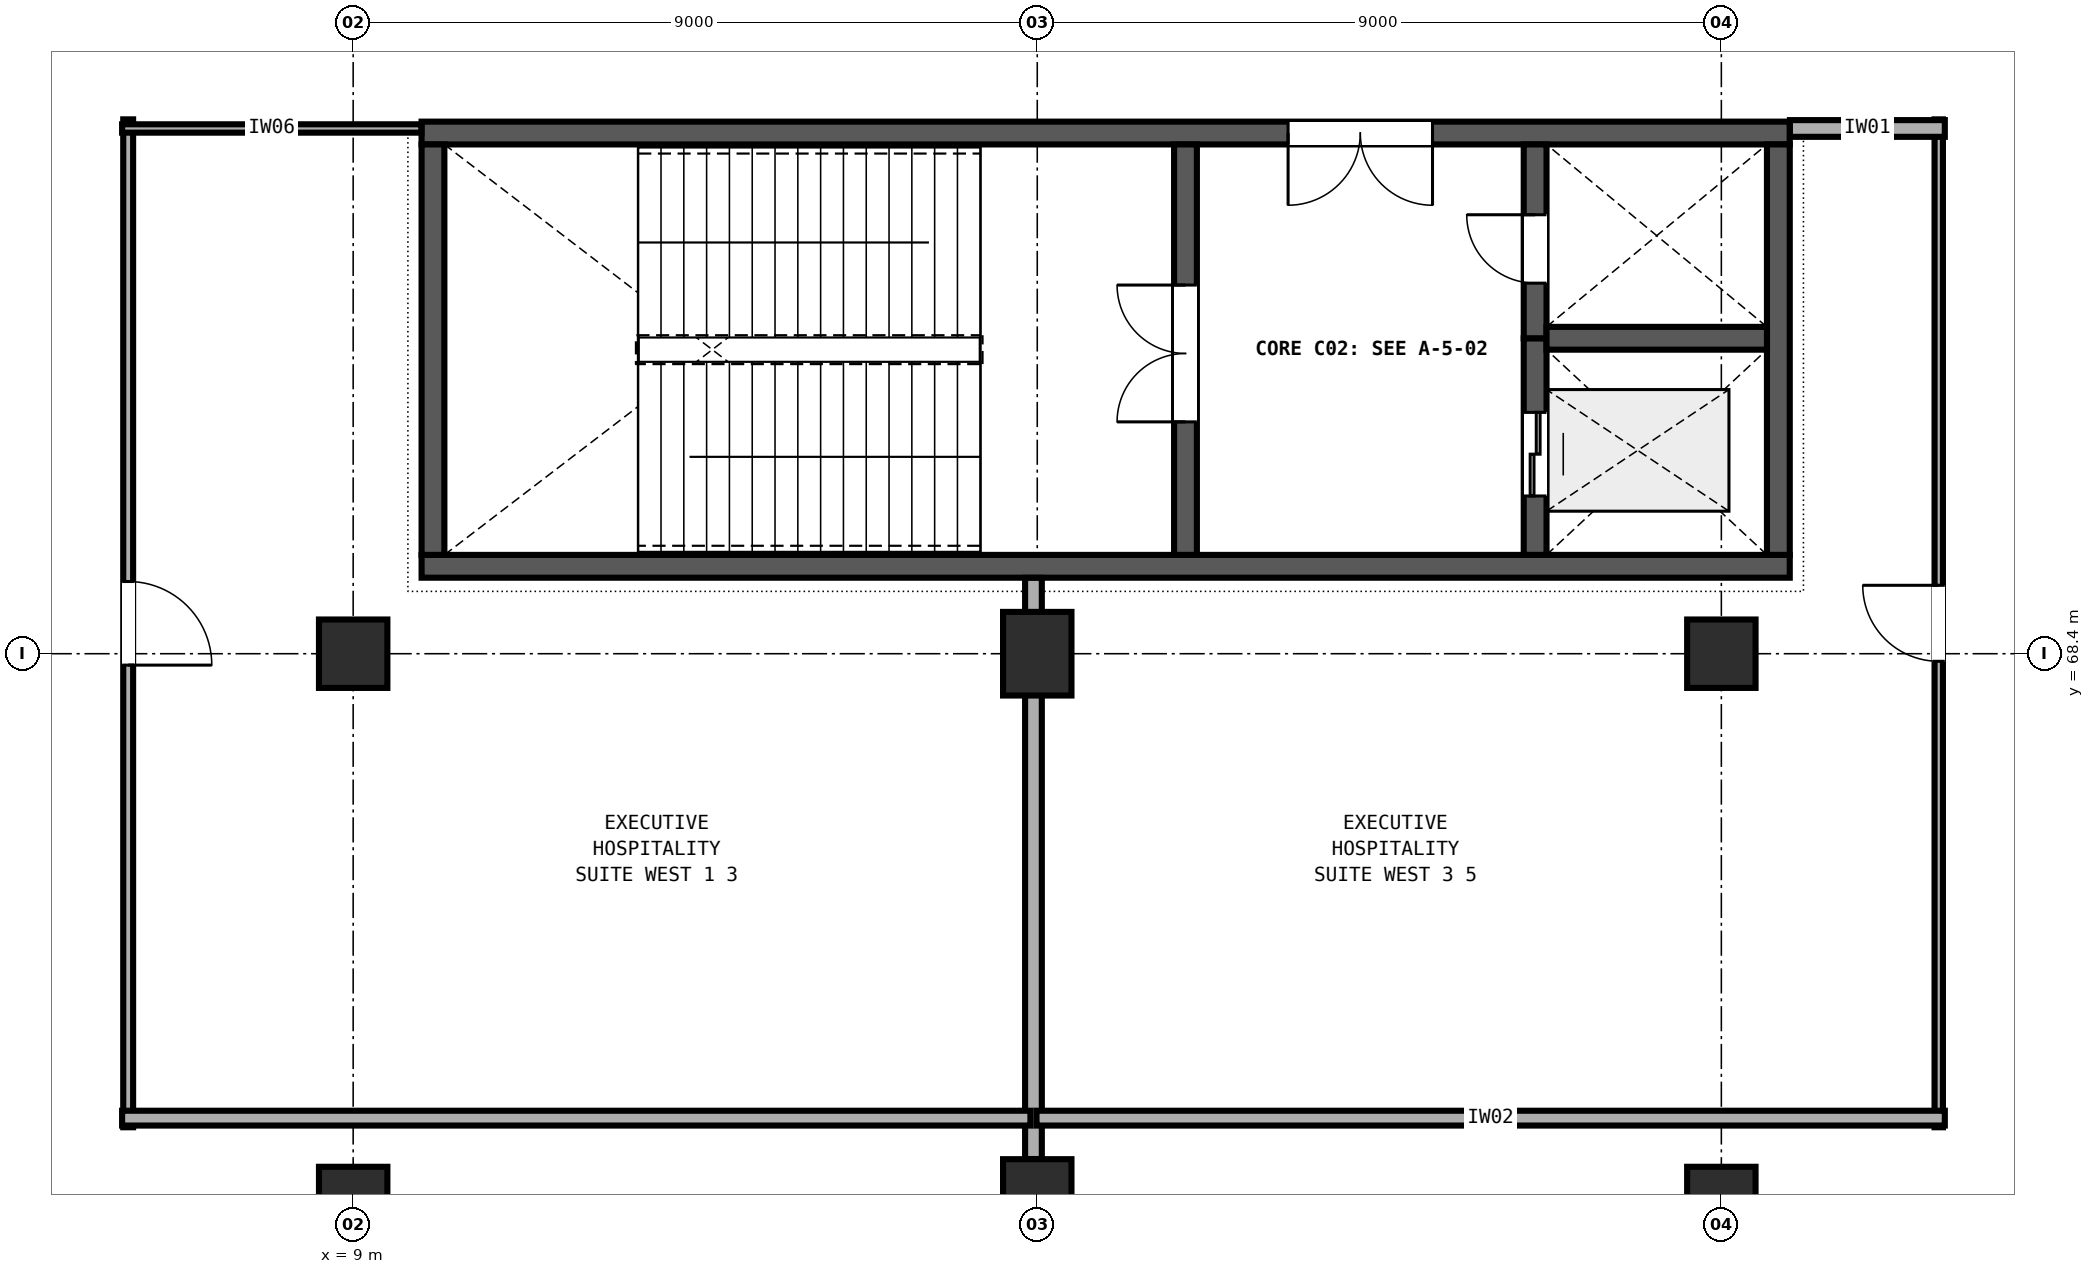
"""IFC4 building model, lengths in metres.
Left out: names, types, materials, properties, quantities, classifications, styles, units other than length and angle.
Written with IfcOpenShell. Run it as: python <this file> out.ifc"""

import sys

from ifc_helpers import new_model, si_unit, direction, frame, frame_2d, origin, origin_2d, place, context, subcontext, project, spatial, rectangle, extrude, element, fill, save


model = new_model("IFC4")
c1 = context("Model", 3, precision=1e-05, world=origin(), true_north=direction((0.0, 1.0)))
c2 = subcontext(c1, "Body", "Model", "MODEL_VIEW")
j1 = project(units=[si_unit("LENGTHUNIT", "METRE"), si_unit("PLANEANGLEUNIT", "RADIAN")], contexts=[c1])
p1 = place(None, origin())
s1 = spatial("IfcSite", under=j1, at=p1, CompositionType="ELEMENT")
p2 = place(p1, origin())
s2 = spatial("IfcBuilding", under=s1, at=p2, CompositionType="ELEMENT")
p3 = place(p2, frame((0.0, 0.0, 14.4)))
s3 = spatial("IfcBuildingStorey", under=s2, at=p3, CompositionType="ELEMENT", Elevation=14.4)
for number, where, z_axis, x_axis in (
    (1, (9.0, 61.2, 0.0), (0.0, 0.0, 1.0), (1.0, 0.0, 0.0)),
    (2, (9.0, 68.4, 0.0), (0.0, 0.0, 1.0), (1.0, 0.0, 0.0)),
):
    element("IfcColumn", number, at=place(p3, frame(where, z_axis=z_axis, x_axis=x_axis)), inside=s3, PredefinedType="COLUMN", context=c2, shape_type="SweptSolid", body=[
        extrude(rectangle(XDim=0.9, YDim=0.9, at=origin_2d()), origin(), (0.0, 0.0, 1.0), 4.8),
    ])
for number, where, z_axis, x_axis in (
    (3, (18.0, 61.2, 0.0), (0.0, 0.0, 1.0), (1.0, 0.0, 0.0)),
    (4, (18.0, 68.4, 0.0), (0.0, 0.0, 1.0), (1.0, 0.0, 0.0)),
):
    element("IfcColumn", number, at=place(p3, frame(where, z_axis=z_axis, x_axis=x_axis)), inside=s3, PredefinedType="COLUMN", context=c2, shape_type="SweptSolid", body=[
        extrude(rectangle(XDim=0.9, YDim=1.1, at=origin_2d()), origin(), (0.0, 0.0, 1.0), 4.8),
    ])
for number, where, z_axis, x_axis in (
    (5, (27.0, 61.2, 0.0), (0.0, 0.0, 1.0), (1.0, 0.0, 0.0)),
    (6, (27.0, 68.4, 0.0), (0.0, 0.0, 1.0), (1.0, 0.0, 0.0)),
):
    element("IfcColumn", number, at=place(p3, frame(where, z_axis=z_axis, x_axis=x_axis)), inside=s3, PredefinedType="COLUMN", context=c2, shape_type="SweptSolid", body=[
        extrude(rectangle(XDim=0.9, YDim=0.9, at=origin_2d()), origin(), (0.0, 0.0, 1.0), 4.8),
    ])
p4 = place(p3, frame((9.9, 69.55, 0.0), z_axis=(0.0, 0.0, 1.0), x_axis=(1.0, 0.0, 0.0)))
e7 = element("IfcWall", 7, at=p4, inside=s3, PredefinedType="SHEAR", context=c2, shape_type="SweptSolid", body=[
    extrude(rectangle(XDim=18.0, YDim=0.3, at=frame_2d((9.0, 0.0))), origin(), (0.0, 0.0, 1.0), 4.48),
])
p5 = place(p3, frame((27.9, 75.25, 0.0), z_axis=(0.0, 0.0, 1.0), x_axis=(-1.0, 0.0, 0.0)))
e8 = element("IfcWall", 8, at=p5, inside=s3, PredefinedType="SHEAR", context=c2, shape_type="SweptSolid", body=[
    extrude(rectangle(XDim=18.0, YDim=0.3, at=frame_2d((9.0, 0.0))), origin(), (0.0, 0.0, 1.0), 4.48),
])
p6 = place(p5, frame((4.7, 0.0, 0.0)))
e9 = element("IfcOpeningElement", 9, at=p6, cuts=e8, PredefinedType="OPENING", context=c2, shape_type="SweptSolid", body=[
    extrude(rectangle(XDim=1.9, YDim=2.25, at=frame_2d((0.95, 1.125))), frame((0.0, 0.16, 0.0), z_axis=(0.0, -1.0, 0.0), x_axis=(1.0, 0.0, 0.0)), (0.0, 0.0, 1.0), 0.32),
])
for number, where, z_axis, x_axis in (
    (10, (10.05, 75.1, 0.0), (0.0, 0.0, 1.0), (0.0, -1.0, 0.0)),
    (11, (27.75, 69.7, 0.0), (0.0, 0.0, 1.0), (0.0, 1.0, 0.0)),
):
    element("IfcWall", number, at=place(p3, frame(where, z_axis=z_axis, x_axis=x_axis)), inside=s3, PredefinedType="SHEAR", context=c2, shape_type="SweptSolid", body=[
        extrude(rectangle(XDim=5.4, YDim=0.3, at=frame_2d((2.7, 0.0))), origin(), (0.0, 0.0, 1.0), 4.48),
    ])
p7 = place(p3, frame((19.95, 69.7, 0.0), z_axis=(0.0, 0.0, 1.0), x_axis=(0.0, 1.0, 0.0)))
e12 = element("IfcWall", 12, at=p7, inside=s3, PredefinedType="SHEAR", context=c2, shape_type="SweptSolid", body=[
    extrude(rectangle(XDim=5.4, YDim=0.3, at=frame_2d((2.7, 0.0))), origin(), (0.0, 0.0, 1.0), 4.48),
])
p8 = place(p7, frame((1.75, 0.0, 0.0)))
e13 = element("IfcOpeningElement", 13, at=p8, cuts=e12, PredefinedType="OPENING", context=c2, shape_type="SweptSolid", body=[
    extrude(rectangle(XDim=1.8, YDim=2.25, at=frame_2d((0.9, 1.125))), frame((0.0, 0.16, 0.0), z_axis=(0.0, -1.0, 0.0), x_axis=(1.0, 0.0, 0.0)), (0.0, 0.0, 1.0), 0.32),
])
p9 = place(p3, frame((24.55, 69.7, 0.0), z_axis=(0.0, 0.0, 1.0), x_axis=(0.0, 1.0, 0.0)))
e14 = element("IfcWall", 14, at=p9, inside=s3, PredefinedType="SHEAR", context=c2, shape_type="SweptSolid", body=[
    extrude(rectangle(XDim=2.85, YDim=0.3, at=frame_2d((1.425, 0.0))), origin(), (0.0, 0.0, 1.0), 4.48),
])
p10 = place(p9, frame((0.775, 0.0, 0.0)))
e15 = element("IfcOpeningElement", 15, at=p10, cuts=e14, PredefinedType="OPENING", context=c2, shape_type="SweptSolid", body=[
    extrude(rectangle(XDim=1.1, YDim=2.1, at=frame_2d((0.55, 1.05))), frame((0.0, 0.16, 0.0), z_axis=(0.0, -1.0, 0.0), x_axis=(1.0, 0.0, 0.0)), (0.0, 0.0, 1.0), 0.32),
])
p11 = place(p3, frame((24.55, 72.55, 0.0), z_axis=(0.0, 0.0, 1.0), x_axis=(0.0, 1.0, 0.0)))
e16 = element("IfcWall", 16, at=p11, inside=s3, PredefinedType="SHEAR", context=c2, shape_type="SweptSolid", body=[
    extrude(rectangle(XDim=2.55, YDim=0.3, at=frame_2d((1.275, 0.0))), origin(), (0.0, 0.0, 1.0), 4.48),
])
p12 = place(p11, frame((0.725, 0.0, 0.0)))
e17 = element("IfcOpeningElement", 17, at=p12, cuts=e16, PredefinedType="OPENING", context=c2, shape_type="SweptSolid", body=[
    extrude(rectangle(XDim=0.9, YDim=2.1, at=frame_2d((0.45, 1.05))), frame((0.0, 0.16, 0.0), z_axis=(0.0, -1.0, 0.0), x_axis=(1.0, 0.0, 0.0)), (0.0, 0.0, 1.0), 0.32),
])
p13 = place(p3, frame((24.7, 72.55, 0.0), z_axis=(0.0, 0.0, 1.0), x_axis=(1.0, 0.0, 0.0)))
e18 = element("IfcWall", 18, at=p13, inside=s3, PredefinedType="SHEAR", context=c2, shape_type="SweptSolid", body=[
    extrude(rectangle(XDim=2.9, YDim=0.3, at=frame_2d((1.45, 0.0))), origin(), (0.0, 0.0, 1.0), 4.48),
])
p14 = place(p3, frame((6.04, 75.43, 0.0), z_axis=(0.0, 0.0, 1.0), x_axis=(0.0, -1.0, 0.0)))
e19 = element("IfcWall", 19, at=p14, inside=s3, PredefinedType="PARTITIONING", context=c2, shape_type="SweptSolid", body=[
    extrude(rectangle(XDim=13.26, YDim=0.13, at=frame_2d((6.63, 0.0))), origin(), (0.0, 0.0, 1.0), 3.56),
])
p15 = place(p14, frame((6.08, 0.0, 0.0)))
e20 = element("IfcOpeningElement", 20, at=p15, cuts=e19, PredefinedType="OPENING", context=c2, shape_type="SweptSolid", body=[
    extrude(rectangle(XDim=1.1, YDim=2.1, at=frame_2d((0.55, 1.05))), frame((0.0, 0.075, 0.0), z_axis=(0.0, -1.0, 0.0), x_axis=(1.0, 0.0, 0.0)), (0.0, 0.0, 1.0), 0.15),
])
p16 = place(p3, frame((5.96, 75.31, 0.0), z_axis=(0.0, 0.0, 1.0), x_axis=(1.0, 0.0, 0.0)))
e21 = element("IfcWall", 21, at=p16, inside=s3, PredefinedType="PARTITIONING", context=c2, shape_type="SweptSolid", body=[
    extrude(rectangle(XDim=3.938, YDim=0.11, at=frame_2d((1.969, 0.0))), origin(), (0.0, 0.0, 1.0), 3.56),
])
p17 = place(p3, frame((17.95, 69.398, 0.0), z_axis=(0.0, 0.0, 1.0), x_axis=(0.0, -1.0, 0.0)))
e22 = element("IfcWall", 22, at=p17, inside=s3, PredefinedType="PARTITIONING", context=c2, shape_type="SweptSolid", body=[
    extrude(rectangle(XDim=7.646, YDim=0.22, at=frame_2d((3.823, 0.0))), origin(), (0.0, 0.0, 1.0), 3.56),
])
p18 = place(p3, frame((17.91, 62.29, 0.0), z_axis=(0.0, 0.0, 1.0), x_axis=(-1.0, 0.0, 0.0)))
e23 = element("IfcWall", 23, at=p18, inside=s3, PredefinedType="PARTITIONING", context=c2, shape_type="SweptSolid", body=[
    extrude(rectangle(XDim=11.95, YDim=0.195, at=frame_2d((5.975, 0.0))), origin(), (0.0, 0.0, 1.0), 3.56),
])
p19 = place(p3, frame((29.86, 62.17, 0.0), z_axis=(0.0, 0.0, 1.0), x_axis=(0.0, 1.0, 0.0)))
e24 = element("IfcWall", 24, at=p19, inside=s3, PredefinedType="PARTITIONING", context=c2, shape_type="SweptSolid", body=[
    extrude(rectangle(XDim=13.26, YDim=0.11, at=frame_2d((6.63, 0.0))), origin(), (0.0, 0.0, 1.0), 3.56),
])
p20 = place(p19, frame((6.13, 0.0, 0.0)))
e25 = element("IfcOpeningElement", 25, at=p20, cuts=e24, PredefinedType="OPENING", context=c2, shape_type="SweptSolid", body=[
    extrude(rectangle(XDim=1.0, YDim=2.1, at=frame_2d((0.5, 1.05))), frame((0.0, 0.065, 0.0), z_axis=(0.0, -1.0, 0.0), x_axis=(1.0, 0.0, 0.0)), (0.0, 0.0, 1.0), 0.13),
])
p21 = place(p3, frame((27.902, 75.31, 0.0), z_axis=(0.0, 0.0, 1.0), x_axis=(1.0, 0.0, 0.0)))
e26 = element("IfcWall", 26, at=p21, inside=s3, PredefinedType="PARTITIONING", context=c2, shape_type="SweptSolid", body=[
    extrude(rectangle(XDim=2.038, YDim=0.22, at=frame_2d((1.019, 0.0))), origin(), (0.0, 0.0, 1.0), 3.56),
])
p22 = place(p3, frame((29.94, 62.29, 0.0), z_axis=(0.0, 0.0, 1.0), x_axis=(-1.0, 0.0, 0.0)))
e27 = element("IfcWall", 27, at=p22, inside=s3, PredefinedType="PARTITIONING", context=c2, shape_type="SweptSolid", body=[
    extrude(rectangle(XDim=11.95, YDim=0.195, at=frame_2d((5.975, 0.0))), origin(), (0.0, 0.0, 1.0), 3.56),
])
p23 = place(p8, origin())
e28 = element("IfcDoor", 28, at=p23, inside=s3, OperationType="DOUBLE_DOOR_SINGLE_SWING", PredefinedType="DOOR", context=c2, shape_type="SweptSolid", body=[
    extrude(rectangle(XDim=1.8, YDim=2.25, at=frame_2d((0.9, 1.125))), frame((0.0, 0.025, 0.0), z_axis=(0.0, -1.0, 0.0), x_axis=(1.0, 0.0, 0.0)), (0.0, 0.0, 1.0), 0.05),
])
fill(e13, e28)
p24 = place(p12, origin())
e29 = element("IfcDoor", 29, at=p24, inside=s3, OperationType="SINGLE_SWING_RIGHT", PredefinedType="DOOR", context=c2, shape_type="SweptSolid", body=[
    extrude(rectangle(XDim=0.9, YDim=2.1, at=frame_2d((0.45, 1.05))), frame((0.0, 0.025, 0.0), z_axis=(0.0, -1.0, 0.0), x_axis=(1.0, 0.0, 0.0)), (0.0, 0.0, 1.0), 0.05),
])
fill(e17, e29)
p25 = place(p10, origin())
e30 = element("IfcDoor", 30, at=p25, inside=s3, OperationType="DOUBLE_DOOR_SLIDING", PredefinedType="DOOR", context=c2, shape_type="SweptSolid", body=[
    extrude(rectangle(XDim=1.1, YDim=2.1, at=frame_2d((0.55, 1.05))), frame((0.0, 0.025, 0.0), z_axis=(0.0, -1.0, 0.0), x_axis=(1.0, 0.0, 0.0)), (0.0, 0.0, 1.0), 0.05),
])
fill(e15, e30)
p26 = place(p6, origin())
e31 = element("IfcDoor", 31, at=p26, inside=s3, OperationType="DOUBLE_DOOR_SINGLE_SWING", PredefinedType="DOOR", context=c2, shape_type="SweptSolid", body=[
    extrude(rectangle(XDim=1.9, YDim=2.25, at=frame_2d((0.95, 1.125))), frame((0.0, 0.025, 0.0), z_axis=(0.0, -1.0, 0.0), x_axis=(1.0, 0.0, 0.0)), (0.0, 0.0, 1.0), 0.05),
])
fill(e9, e31)
p27 = place(p15, origin())
e32 = element("IfcDoor", 32, at=p27, inside=s3, OperationType="SINGLE_SWING_RIGHT", PredefinedType="DOOR", context=c2, shape_type="SweptSolid", body=[
    extrude(rectangle(XDim=1.1, YDim=2.1, at=frame_2d((0.55, 1.05))), frame((0.0, 0.025, 0.0), z_axis=(0.0, -1.0, 0.0), x_axis=(1.0, 0.0, 0.0)), (0.0, 0.0, 1.0), 0.05),
])
fill(e20, e32)
p28 = place(p20, origin())
e33 = element("IfcDoor", 33, at=p28, inside=s3, OperationType="SINGLE_SWING_RIGHT", PredefinedType="DOOR", context=c2, shape_type="SweptSolid", body=[
    extrude(rectangle(XDim=1.0, YDim=2.1, at=frame_2d((0.5, 1.05))), frame((0.0, 0.025, 0.0), z_axis=(0.0, -1.0, 0.0), x_axis=(1.0, 0.0, 0.0)), (0.0, 0.0, 1.0), 0.05),
])
fill(e25, e33)
save(model, sys.argv[1])
